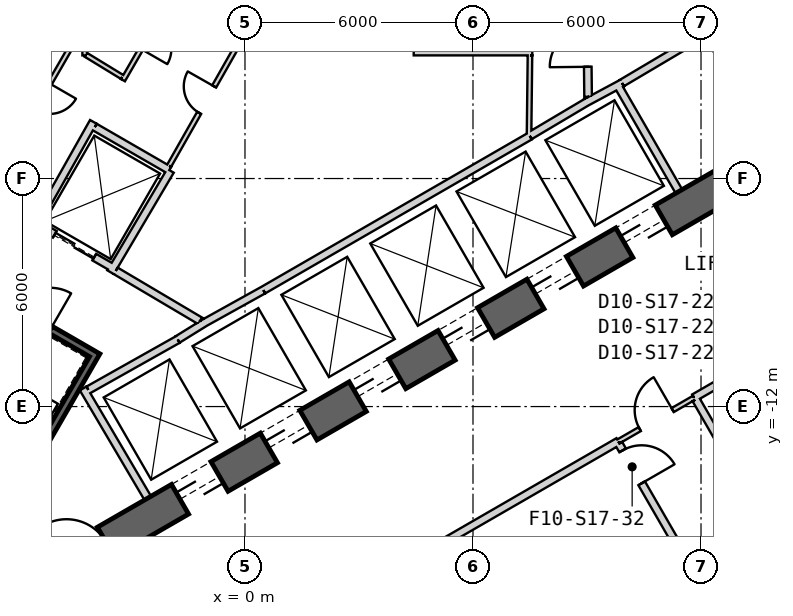
"""IFC4 building model, lengths in metres.
Left out: names, types, materials, properties, quantities, classifications, styles, units other than length and angle.
Written with IfcOpenShell. Run it as: python <this file> out.ifc"""

import sys

from ifc_helpers import new_model, si_unit, direction, frame, frame_2d, origin, place, context, subcontext, project, spatial, rectangle, extrude, element, fill, save


model = new_model("IFC4")
c1 = context("Model", 3, precision=1e-05, world=origin(), true_north=direction((0.0, 1.0)))
c2 = subcontext(c1, "Body", "Model", "MODEL_VIEW")
j1 = project(units=[si_unit("LENGTHUNIT", "METRE"), si_unit("PLANEANGLEUNIT", "RADIAN")], contexts=[c1])
p1 = place(None, origin())
s1 = spatial("IfcSite", under=j1, at=p1, CompositionType="ELEMENT")
p2 = place(p1, origin())
s2 = spatial("IfcBuilding", under=s1, at=p2, CompositionType="ELEMENT")
p3 = place(p2, frame((0.0, 0.0, 265.2)))
s3 = spatial("IfcBuildingStorey", under=s2, at=p3, CompositionType="ELEMENT", Elevation=265.2)
p4 = place(p3, frame((-7.825, -17.97, 0.0), z_axis=(0.0, 0.0, 1.0), x_axis=(0.866028369851, 0.499994862586, 0.0)))
e1 = element("IfcWall", 1, at=p4, inside=s3, PredefinedType="SHEAR", context=c2, shape_type="SweptSolid", body=[
    extrude(rectangle(XDim=31.523, YDim=0.9, at=frame_2d((15.762, 0.0))), origin(), (0.0, 0.0, 1.0), 4.0),
])
p5 = place(p4, frame((7.062, 0.0, 0.0)))
e2 = element("IfcOpeningElement", 2, at=p5, cuts=e1, PredefinedType="OPENING", context=c2, shape_type="SweptSolid", body=[
    extrude(rectangle(XDim=1.2, YDim=2.4, at=frame_2d((0.6, 1.2))), frame((0.0, 0.46, 0.0), z_axis=(0.0, -1.0, 0.0), x_axis=(1.0, 0.0, 0.0)), (0.0, 0.0, 1.0), 0.92),
])
p6 = place(p4, frame((9.762, 0.0, 0.0)))
e3 = element("IfcOpeningElement", 3, at=p6, cuts=e1, PredefinedType="OPENING", context=c2, shape_type="SweptSolid", body=[
    extrude(rectangle(XDim=1.2, YDim=2.4, at=frame_2d((0.6, 1.2))), frame((0.0, 0.46, 0.0), z_axis=(0.0, -1.0, 0.0), x_axis=(1.0, 0.0, 0.0)), (0.0, 0.0, 1.0), 0.92),
])
p7 = place(p4, frame((12.462, 0.0, 0.0)))
e4 = element("IfcOpeningElement", 4, at=p7, cuts=e1, PredefinedType="OPENING", context=c2, shape_type="SweptSolid", body=[
    extrude(rectangle(XDim=1.2, YDim=2.4, at=frame_2d((0.6, 1.2))), frame((0.0, 0.46, 0.0), z_axis=(0.0, -1.0, 0.0), x_axis=(1.0, 0.0, 0.0)), (0.0, 0.0, 1.0), 0.92),
])
p8 = place(p4, frame((15.162, 0.0, 0.0)))
e5 = element("IfcOpeningElement", 5, at=p8, cuts=e1, PredefinedType="OPENING", context=c2, shape_type="SweptSolid", body=[
    extrude(rectangle(XDim=1.2, YDim=2.4, at=frame_2d((0.6, 1.2))), frame((0.0, 0.46, 0.0), z_axis=(0.0, -1.0, 0.0), x_axis=(1.0, 0.0, 0.0)), (0.0, 0.0, 1.0), 0.92),
])
p9 = place(p4, frame((17.862, 0.0, 0.0)))
e6 = element("IfcOpeningElement", 6, at=p9, cuts=e1, PredefinedType="OPENING", context=c2, shape_type="SweptSolid", body=[
    extrude(rectangle(XDim=1.2, YDim=2.4, at=frame_2d((0.6, 1.2))), frame((0.0, 0.46, 0.0), z_axis=(0.0, -1.0, 0.0), x_axis=(1.0, 0.0, 0.0)), (0.0, 0.0, 1.0), 0.92),
])
p10 = place(p4, frame((20.562, 0.0, 0.0)))
e7 = element("IfcOpeningElement", 7, at=p10, cuts=e1, PredefinedType="OPENING", context=c2, shape_type="SweptSolid", body=[
    extrude(rectangle(XDim=1.2, YDim=2.4, at=frame_2d((0.6, 1.2))), frame((0.0, 0.46, 0.0), z_axis=(0.0, -1.0, 0.0), x_axis=(1.0, 0.0, 0.0)), (0.0, 0.0, 1.0), 0.92),
])
p11 = place(p4, frame((26.712, 0.0, 0.0)))
e8 = element("IfcOpeningElement", 8, at=p11, cuts=e1, PredefinedType="OPENING", context=c2, shape_type="SweptSolid", body=[
    extrude(rectangle(XDim=1.2, YDim=2.4, at=frame_2d((0.6, 1.2))), frame((0.0, 0.46, 0.0), z_axis=(0.0, -1.0, 0.0), x_axis=(1.0, 0.0, 0.0)), (0.0, 0.0, 1.0), 0.92),
])
p12 = place(p4, frame((3.612, 0.0, 0.0)))
e9 = element("IfcOpeningElement", 9, at=p12, cuts=e1, PredefinedType="OPENING", context=c2, shape_type="SweptSolid", body=[
    extrude(rectangle(XDim=1.2, YDim=2.4, at=frame_2d((0.6, 1.2))), frame((0.0, 0.46, 0.0), z_axis=(0.0, -1.0, 0.0), x_axis=(1.0, 0.0, 0.0)), (0.0, 0.0, 1.0), 0.92),
])
p13 = place(p3, frame((0.483, -8.936, 0.0), z_axis=(0.0, 0.0, 1.0), x_axis=(0.866030989016, 0.499990325971, 0.0)))
e10 = element("IfcWall", 10, at=p13, inside=s3, PredefinedType="PLUMBINGWALL", context=c2, shape_type="SweptSolid", body=[
    extrude(rectangle(XDim=8.1, YDim=0.2, at=frame_2d((4.05, 0.0))), origin(), (0.0, 0.0, 1.0), 3.7),
])
p14 = place(p3, frame((9.795, -3.525, 0.0), z_axis=(0.0, 0.0, 1.0), x_axis=(0.499984717929, -0.866034226713, 0.0)))
e11 = element("IfcWall", 11, at=p14, inside=s3, PredefinedType="PLUMBINGWALL", context=c2, shape_type="SweptSolid", body=[
    extrude(rectangle(XDim=3.25, YDim=0.2, at=frame_2d((1.625, 0.0))), origin(), (0.0, 0.0, 1.0), 3.7),
])
p15 = place(p3, frame((8.974, -3.999, 0.0), z_axis=(0.0, 0.0, 1.0), x_axis=(0.880907015104, 0.473289373154, 0.0)))
e12 = element("IfcWall", 12, at=p15, inside=s3, PredefinedType="PLUMBINGWALL", context=c2, shape_type="SweptSolid", body=[
    extrude(rectangle(XDim=1.078, YDim=0.2, at=frame_2d((0.539, 0.0))), origin(), (0.0, 0.0, 1.0), 3.7),
])
p16 = place(p3, frame((7.493, -4.878, 0.0), z_axis=(0.0, 0.0, 1.0), x_axis=(0.859981807212, 0.510324691999, 0.0)))
e13 = element("IfcWall", 13, at=p16, inside=s3, PredefinedType="PLUMBINGWALL", context=c2, shape_type="SweptSolid", body=[
    extrude(rectangle(XDim=1.845, YDim=0.2, at=frame_2d((0.922, 0.0))), origin(), (0.0, 0.0, 1.0), 3.7),
])
p17 = place(p3, frame((-2.558, -14.409, 0.0), z_axis=(0.0, 0.0, 1.0), x_axis=(-0.507997497166, 0.861358544901, 0.0)))
e14 = element("IfcWall", 14, at=p17, inside=s3, PredefinedType="PLUMBINGWALL", context=c2, shape_type="SweptSolid", body=[
    extrude(rectangle(XDim=3.35, YDim=0.2, at=frame_2d((1.675, 0.0))), origin(), (0.0, 0.0, 1.0), 3.7),
])
p18 = place(p3, frame((-1.769, -10.237, 0.0), z_axis=(0.0, 0.0, 1.0), x_axis=(-0.871534483978, -0.490334215854, 0.0)))
e15 = element("IfcWall", 15, at=p18, inside=s3, PredefinedType="PLUMBINGWALL", context=c2, shape_type="SweptSolid", body=[
    extrude(rectangle(XDim=2.7, YDim=0.2, at=frame_2d((1.35, 0.0))), origin(), (0.0, 0.0, 1.0), 3.7),
])
p19 = place(p3, frame((-1.024, -9.771, 0.0), z_axis=(0.0, 0.0, 1.0), x_axis=(-0.850348075135, -0.526220629693, 0.0)))
e16 = element("IfcWall", 16, at=p19, inside=s3, PredefinedType="PLUMBINGWALL", context=c2, shape_type="SweptSolid", body=[
    extrude(rectangle(XDim=0.878, YDim=0.2, at=frame_2d((0.439, 0.0))), origin(), (0.0, 0.0, 1.0), 3.7),
])
p20 = place(p3, frame((-1.13, -9.831, 0.0), z_axis=(0.0, 0.0, 1.0), x_axis=(0.874269620932, 0.485440655401, 0.0)))
e17 = element("IfcWall", 17, at=p20, inside=s3, PredefinedType="PLUMBINGWALL", context=c2, shape_type="SweptSolid", body=[
    extrude(rectangle(XDim=1.845, YDim=0.2, at=frame_2d((0.922, 0.0))), origin(), (0.0, 0.0, 1.0), 3.7),
])
p21 = place(p3, frame((-3.905, -10.563, -0.3), z_axis=(0.0, 0.0, 1.0), x_axis=(-0.500012932018, -0.866017937352, 0.0)))
e18 = element("IfcWall", 18, at=p21, inside=s3, PredefinedType="SHEAR", context=c2, shape_type="SweptSolid", body=[
    extrude(rectangle(XDim=8.1, YDim=0.2, at=frame_2d((4.05, 0.0))), origin(), (0.0, 0.0, 1.0), 4.0),
])
p22 = place(p3, frame((-4.041, -10.599, -0.3), z_axis=(0.0, 0.0, 1.0), x_axis=(-0.866047807691, 0.499961193289, 0.0)))
e19 = element("IfcWall", 19, at=p22, inside=s3, PredefinedType="SHEAR", context=c2, shape_type="SweptSolid", body=[
    extrude(rectangle(XDim=3.6, YDim=0.2, at=frame_2d((1.8, 0.0))), origin(), (0.0, 0.0, 1.0), 4.0),
])
p23 = place(p22, frame((1.25, 0.0, 0.3)))
e20 = element("IfcOpeningElement", 20, at=p23, cuts=e19, PredefinedType="OPENING", context=c2, shape_type="SweptSolid", body=[
    extrude(rectangle(XDim=1.1, YDim=2.1, at=frame_2d((0.55, 1.05))), frame((0.0, 0.11, 0.0), z_axis=(0.0, -1.0, 0.0), x_axis=(1.0, 0.0, 0.0)), (0.0, 0.0, 1.0), 0.22),
])
p24 = place(p3, frame((-3.446, -8.368, 0.0), z_axis=(0.0, 0.0, 1.0), x_axis=(-0.866024647952, 0.500001309137, 0.0)))
e21 = element("IfcWall", 21, at=p24, inside=s3, PredefinedType="PLUMBINGWALL", context=c2, shape_type="SweptSolid", body=[
    extrude(rectangle(XDim=2.4, YDim=0.2, at=frame_2d((1.2, 0.0))), origin(), (0.0, 0.0, 1.0), 3.7),
])
p25 = place(p24, frame((0.6, 0.0, 0.0)))
e22 = element("IfcOpeningElement", 22, at=p25, cuts=e21, PredefinedType="OPENING", context=c2, shape_type="SweptSolid", body=[
    extrude(rectangle(XDim=1.2, YDim=2.4, at=frame_2d((0.6, 1.2))), frame((0.0, 0.11, 0.0), z_axis=(0.0, -1.0, 0.0), x_axis=(1.0, 0.0, 0.0)), (0.0, 0.0, 1.0), 0.22),
])
p26 = place(p3, frame((-1.961, -5.796, 0.0), z_axis=(0.0, 0.0, 1.0), x_axis=(-0.508647062354, -0.860975125052, 0.0)))
e23 = element("IfcWall", 23, at=p26, inside=s3, PredefinedType="PLUMBINGWALL", context=c2, shape_type="SweptSolid", body=[
    extrude(rectangle(XDim=3.1, YDim=0.2, at=frame_2d((1.55, 0.0))), origin(), (0.0, 0.0, 1.0), 3.7),
])
p27 = place(p3, frame((-3.99, -4.509, 0.0), z_axis=(0.0, 0.0, 1.0), x_axis=(-0.491358283181, -0.870957540612, 0.0)))
e24 = element("IfcWall", 24, at=p27, inside=s3, PredefinedType="PLUMBINGWALL", context=c2, shape_type="SweptSolid", body=[
    extrude(rectangle(XDim=3.2, YDim=0.2, at=frame_2d((1.6, 0.0))), origin(), (0.0, 0.0, 1.0), 3.7),
])
p28 = place(p3, frame((-3.953, -4.646, 0.0), z_axis=(0.0, 0.0, 1.0), x_axis=(0.866065302921, -0.4999308863, 0.0)))
e25 = element("IfcWall", 25, at=p28, inside=s3, PredefinedType="PLUMBINGWALL", context=c2, shape_type="SweptSolid", body=[
    extrude(rectangle(XDim=2.264, YDim=0.2, at=frame_2d((1.132, 0.0))), origin(), (0.0, 0.0, 1.0), 3.7),
])
p29 = place(p3, frame((12.245, -2.109, 0.0), z_axis=(0.0, 0.0, 1.0), x_axis=(-0.860414880418, -0.509594185166, 0.0)))
e26 = element("IfcWall", 26, at=p29, inside=s3, PredefinedType="PARTITIONING", context=c2, shape_type="SweptSolid", body=[
    extrude(rectangle(XDim=2.7, YDim=0.2, at=frame_2d((1.35, 0.0))), origin(), (0.0, 0.0, 1.0), 3.7),
])
p30 = place(p3, frame((13.758, -4.99, 0.0), z_axis=(0.0, 0.0, 1.0), x_axis=(-0.491993409184, 0.87059892334, 0.0)))
e27 = element("IfcWall", 27, at=p30, inside=s3, PredefinedType="PARTITIONING", context=c2, shape_type="SweptSolid", body=[
    extrude(rectangle(XDim=3.15, YDim=0.2, at=frame_2d((1.575, 0.0))), origin(), (0.0, 0.0, 1.0), 3.7),
])
p31 = place(p30, frame((1.175, 0.0, 0.0)))
e28 = element("IfcOpeningElement", 28, at=p31, cuts=e27, PredefinedType="OPENING", context=c2, shape_type="SweptSolid", body=[
    extrude(rectangle(XDim=0.8, YDim=2.1, at=frame_2d((0.4, 1.05))), frame((0.0, 0.11, 0.0), z_axis=(0.0, -1.0, 0.0), x_axis=(1.0, 0.0, 0.0)), (0.0, 0.0, 1.0), 0.22),
])
p32 = place(p3, frame((9.029, -3.851, 0.0), z_axis=(0.0, 0.0, 1.0), x_axis=(-0.010783593937, 0.99994185536, 0.0)))
e29 = element("IfcWall", 29, at=p32, inside=s3, PredefinedType="PARTITIONING", context=c2, shape_type="SweptSolid", body=[
    extrude(rectangle(XDim=2.581, YDim=0.2, at=frame_2d((1.291, 0.0))), origin(), (0.0, 0.0, 1.0), 3.7),
])
p33 = place(p32, frame((0.791, 0.0, 0.0)))
e30 = element("IfcOpeningElement", 30, at=p33, cuts=e29, PredefinedType="OPENING", context=c2, shape_type="SweptSolid", body=[
    extrude(rectangle(XDim=1.0, YDim=2.1, at=frame_2d((0.5, 1.05))), frame((0.0, 0.11, 0.0), z_axis=(0.0, -1.0, 0.0), x_axis=(1.0, 0.0, 0.0)), (0.0, 0.0, 1.0), 0.22),
])
p34 = place(p3, frame((-3.401, -8.43, 0.0), z_axis=(0.0, 0.0, 1.0), x_axis=(0.860615607571, -0.509255118781, 0.0)))
e31 = element("IfcWall", 31, at=p34, inside=s3, PredefinedType="PARTITIONING", context=c2, shape_type="SweptSolid", body=[
    extrude(rectangle(XDim=2.581, YDim=0.2, at=frame_2d((1.29, 0.0))), origin(), (0.0, 0.0, 1.0), 3.7),
])
p35 = place(p3, frame((0.029, -2.099, 0.0), z_axis=(0.0, 0.0, 1.0), x_axis=(-0.49376265119, -0.869596713592, 0.0)))
e32 = element("IfcWall", 32, at=p35, inside=s3, PredefinedType="PARTITIONING", context=c2, shape_type="SweptSolid", body=[
    extrude(rectangle(XDim=4.097, YDim=0.12, at=frame_2d((2.048, 0.0))), origin(), (0.0, 0.0, 1.0), 3.7),
])
p36 = place(p35, frame((1.7, 0.0, 0.0)))
e33 = element("IfcOpeningElement", 33, at=p36, cuts=e32, PredefinedType="OPENING", context=c2, shape_type="SweptSolid", body=[
    extrude(rectangle(XDim=0.8, YDim=2.1, at=frame_2d((0.4, 1.05))), frame((0.0, 0.07, 0.0), z_axis=(0.0, -1.0, 0.0), x_axis=(1.0, 0.0, 0.0)), (0.0, 0.0, 1.0), 0.14),
])
p37 = place(p3, frame((4.5, -2.76, 0.0), z_axis=(0.0, 0.0, 1.0), x_axis=(0.0, 1.0, 0.0)))
e34 = element("IfcWall", 34, at=p37, inside=s3, PredefinedType="PARTITIONING", context=c2, shape_type="SweptSolid", body=[
    extrude(rectangle(XDim=1.625, YDim=0.12, at=frame_2d((0.812, 0.0))), origin(), (0.0, 0.0, 1.0), 3.7),
])
p38 = place(p3, frame((7.56, -2.7, 0.0), z_axis=(0.0, 0.0, 1.0), x_axis=(-1.0, 0.0, 0.0)))
e35 = element("IfcWall", 35, at=p38, inside=s3, PredefinedType="PARTITIONING", context=c2, shape_type="SweptSolid", body=[
    extrude(rectangle(XDim=3.0, YDim=0.12, at=frame_2d((1.5, 0.0))), origin(), (0.0, 0.0, 1.0), 3.7),
])
p39 = place(p3, frame((7.475, -4.865, 0.0), z_axis=(0.0, 0.0, 1.0), x_axis=(0.011716133148, 0.999931363757, 0.0)))
e36 = element("IfcWall", 36, at=p39, inside=s3, PredefinedType="PARTITIONING", context=c2, shape_type="SweptSolid", body=[
    extrude(rectangle(XDim=2.105, YDim=0.12, at=frame_2d((1.052, 0.0))), origin(), (0.0, 0.0, 1.0), 3.7),
])
p40 = place(p3, frame((-4.219, -2.76, 0.0), z_axis=(0.0, 0.0, 1.0), x_axis=(0.0, 1.0, 0.0)))
e37 = element("IfcWall", 37, at=p40, inside=s3, PredefinedType="PARTITIONING", context=c2, shape_type="SweptSolid", body=[
    extrude(rectangle(XDim=5.521, YDim=0.12, at=frame_2d((2.76, 0.0))), origin(), (0.0, 0.0, 1.0), 3.7),
])
p41 = place(p3, frame((-6.118, -5.197, 0.0), z_axis=(0.0, 0.0, 1.0), x_axis=(0.499979045085, 0.866037501772, 0.0)))
e38 = element("IfcWall", 38, at=p41, inside=s3, PredefinedType="PARTITIONING", context=c2, shape_type="SweptSolid", body=[
    extrude(rectangle(XDim=3.679, YDim=0.12, at=frame_2d((1.839, 0.0))), origin(), (0.0, 0.0, 1.0), 3.7),
])
p42 = place(p41, frame((1.16, 0.0, 0.0)))
e39 = element("IfcOpeningElement", 39, at=p42, cuts=e38, PredefinedType="OPENING", context=c2, shape_type="SweptSolid", body=[
    extrude(rectangle(XDim=0.8, YDim=2.1, at=frame_2d((0.4, 1.05))), frame((0.0, 0.07, 0.0), z_axis=(0.0, -1.0, 0.0), x_axis=(1.0, 0.0, 0.0)), (0.0, 0.0, 1.0), 0.14),
])
p43 = place(p3, frame((-3.211, -3.412, 0.0), z_axis=(0.0, 0.0, 1.0), x_axis=(0.500013727357, 0.866017478146, 0.0)))
e40 = element("IfcWall", 40, at=p43, inside=s3, PredefinedType="PARTITIONING", context=c2, shape_type="SweptSolid", body=[
    extrude(rectangle(XDim=2.636, YDim=0.12, at=frame_2d((1.318, 0.0))), origin(), (0.0, 0.0, 1.0), 3.7),
])
p44 = place(p43, frame((0.948, 0.0, 0.0)))
e41 = element("IfcOpeningElement", 41, at=p44, cuts=e40, PredefinedType="OPENING", context=c2, shape_type="SweptSolid", body=[
    extrude(rectangle(XDim=0.8, YDim=2.1, at=frame_2d((0.4, 1.05))), frame((0.0, 0.07, 0.0), z_axis=(0.0, -1.0, 0.0), x_axis=(1.0, 0.0, 0.0)), (0.0, 0.0, 1.0), 0.14),
])
p45 = place(p3, frame((-4.189, -2.744, 0.0), z_axis=(0.0, 0.0, 1.0), x_axis=(0.853217230587, -0.521555708845, 0.0)))
e42 = element("IfcWall", 42, at=p45, inside=s3, PredefinedType="PARTITIONING", context=c2, shape_type="SweptSolid", body=[
    extrude(rectangle(XDim=1.121, YDim=0.12, at=frame_2d((0.561, 0.0))), origin(), (0.0, 0.0, 1.0), 3.7),
])
p46 = place(p3, frame((9.825, -12.918, 0.0), z_axis=(0.0, 0.0, 1.0), x_axis=(0.86602648383, 0.499998129301, 0.0)))
e43 = element("IfcWall", 43, at=p46, inside=s3, PredefinedType="PARTITIONING", context=c2, shape_type="SweptSolid", body=[
    extrude(rectangle(XDim=2.3, YDim=0.12, at=frame_2d((1.15, 0.0))), origin(), (0.0, 0.0, 1.0), 3.7),
])
p47 = place(p46, frame((0.65, 0.0, 0.0)))
e44 = element("IfcOpeningElement", 44, at=p47, cuts=e43, PredefinedType="OPENING", context=c2, shape_type="SweptSolid", body=[
    extrude(rectangle(XDim=1.0, YDim=2.1, at=frame_2d((0.5, 1.05))), frame((0.0, 0.07, 0.0), z_axis=(0.0, -1.0, 0.0), x_axis=(1.0, 0.0, 0.0)), (0.0, 0.0, 1.0), 0.14),
])
p48 = place(p3, frame((-6.366, -22.266, 0.0), z_axis=(0.0, 0.0, 1.0), x_axis=(0.866027932408, 0.49999562027, 0.0)))
e45 = element("IfcWall", 45, at=p48, inside=s3, PredefinedType="PARTITIONING", context=c2, shape_type="SweptSolid", body=[
    extrude(rectangle(XDim=18.697, YDim=0.2, at=frame_2d((9.348, 0.0))), origin(), (0.0, 0.0, 1.0), 2.98),
])
p49 = place(p3, frame((11.817, -11.768, 0.0), z_axis=(0.0, 0.0, 1.0), x_axis=(0.866029971876, 0.49999208775, 0.0)))
e46 = element("IfcWall", 46, at=p49, inside=s3, PredefinedType="PARTITIONING", context=c2, shape_type="SweptSolid", body=[
    extrude(rectangle(XDim=12.096, YDim=0.2, at=frame_2d((6.048, 0.0))), origin(), (0.0, 0.0, 1.0), 2.98),
])
p50 = place(p3, frame((16.093, -19.134, 0.0), z_axis=(0.0, 0.0, 1.0), x_axis=(-0.500004849665, 0.866022603811, 0.0)))
e47 = element("IfcWall", 47, at=p50, inside=s3, PredefinedType="PARTITIONING", context=c2, shape_type="SweptSolid", body=[
    extrude(rectangle(XDim=8.457, YDim=0.2, at=frame_2d((4.228, 0.0))), origin(), (0.0, 0.0, 1.0), 3.7),
])
p51 = place(p50, frame((3.728, 0.0, 0.0)))
e48 = element("IfcOpeningElement", 48, at=p51, cuts=e47, PredefinedType="OPENING", context=c2, shape_type="SweptSolid", body=[
    extrude(rectangle(XDim=1.0, YDim=2.1, at=frame_2d((0.5, 1.05))), frame((0.0, 0.11, 0.0), z_axis=(0.0, -1.0, 0.0), x_axis=(1.0, 0.0, 0.0)), (0.0, 0.0, 1.0), 0.22),
])
p52 = place(p3, frame((9.838, -12.98, 0.0), z_axis=(0.0, 0.0, 1.0), x_axis=(0.499982124662, -0.866035723869, 0.0)))
e49 = element("IfcWall", 49, at=p52, inside=s3, PredefinedType="PARTITIONING", context=c2, shape_type="SweptSolid", body=[
    extrude(rectangle(XDim=8.274, YDim=0.2, at=frame_2d((4.137, 0.0))), origin(), (0.0, 0.0, 1.0), 3.7),
])
p53 = place(p52, frame((0.2, 0.0, 0.0)))
e50 = element("IfcOpeningElement", 50, at=p53, cuts=e49, PredefinedType="OPENING", context=c2, shape_type="SweptSolid", body=[
    extrude(rectangle(XDim=1.0, YDim=2.1, at=frame_2d((0.5, 1.05))), frame((0.0, 0.11, 0.0), z_axis=(0.0, -1.0, 0.0), x_axis=(1.0, 0.0, 0.0)), (0.0, 0.0, 1.0), 0.22),
])
p54 = place(p33, origin())
e51 = element("IfcDoor", 51, at=p54, inside=s3, OperationType="SINGLE_SWING_RIGHT", PredefinedType="USERDEFINED", context=c2, shape_type="SweptSolid", body=[
    extrude(rectangle(XDim=1.0, YDim=2.1, at=frame_2d((0.5, 1.05))), frame((0.0, 0.025, 0.0), z_axis=(0.0, -1.0, 0.0), x_axis=(1.0, 0.0, 0.0)), (0.0, 0.0, 1.0), 0.05),
])
fill(e30, e51)
p55 = place(p25, origin())
e52 = element("IfcDoor", 52, at=p55, inside=s3, OperationType="SLIDING_TO_LEFT", PredefinedType="USERDEFINED", context=c2, shape_type="SweptSolid", body=[
    extrude(rectangle(XDim=1.2, YDim=2.4, at=frame_2d((0.6, 1.2))), frame((0.0, 0.025, 0.0), z_axis=(0.0, -1.0, 0.0), x_axis=(1.0, 0.0, 0.0)), (0.0, 0.0, 1.0), 0.05),
])
fill(e22, e52)
p56 = place(p36, origin())
e53 = element("IfcDoor", 53, at=p56, inside=s3, OperationType="SINGLE_SWING_RIGHT", PredefinedType="USERDEFINED", context=c2, shape_type="SweptSolid", body=[
    extrude(rectangle(XDim=0.8, YDim=2.1, at=frame_2d((0.4, 1.05))), frame((0.0, 0.025, 0.0), z_axis=(0.0, -1.0, 0.0), x_axis=(1.0, 0.0, 0.0)), (0.0, 0.0, 1.0), 0.05),
])
fill(e33, e53)
p57 = place(p47, origin())
e54 = element("IfcDoor", 54, at=p57, inside=s3, OperationType="SINGLE_SWING_RIGHT", PredefinedType="NOTDEFINED", context=c2, shape_type="SweptSolid", body=[
    extrude(rectangle(XDim=1.0, YDim=2.1, at=frame_2d((0.5, 1.05))), frame((0.0, 0.025, 0.0), z_axis=(0.0, -1.0, 0.0), x_axis=(1.0, 0.0, 0.0)), (0.0, 0.0, 1.0), 0.05),
])
fill(e44, e54)
p58 = place(p53, origin())
e55 = element("IfcDoor", 55, at=p58, inside=s3, OperationType="SINGLE_SWING_RIGHT", PredefinedType="USERDEFINED", context=c2, shape_type="SweptSolid", body=[
    extrude(rectangle(XDim=1.0, YDim=2.1, at=frame_2d((0.5, 1.05))), frame((0.0, 0.025, 0.0), z_axis=(0.0, -1.0, 0.0), x_axis=(1.0, 0.0, 0.0)), (0.0, 0.0, 1.0), 0.05),
])
fill(e50, e55)
p59 = place(p5, origin())
e56 = element("IfcDoor", 56, at=p59, inside=s3, OperationType="SLIDING_TO_LEFT", PredefinedType="USERDEFINED", context=c2, shape_type="SweptSolid", body=[
    extrude(rectangle(XDim=1.2, YDim=2.4, at=frame_2d((0.6, 1.2))), frame((0.0, 0.025, 0.0), z_axis=(0.0, -1.0, 0.0), x_axis=(1.0, 0.0, 0.0)), (0.0, 0.0, 1.0), 0.05),
])
fill(e2, e56)
p60 = place(p6, origin())
e57 = element("IfcDoor", 57, at=p60, inside=s3, OperationType="SLIDING_TO_LEFT", PredefinedType="USERDEFINED", context=c2, shape_type="SweptSolid", body=[
    extrude(rectangle(XDim=1.2, YDim=2.4, at=frame_2d((0.6, 1.2))), frame((0.0, 0.025, 0.0), z_axis=(0.0, -1.0, 0.0), x_axis=(1.0, 0.0, 0.0)), (0.0, 0.0, 1.0), 0.05),
])
fill(e3, e57)
p61 = place(p7, origin())
e58 = element("IfcDoor", 58, at=p61, inside=s3, OperationType="SLIDING_TO_LEFT", PredefinedType="USERDEFINED", context=c2, shape_type="SweptSolid", body=[
    extrude(rectangle(XDim=1.2, YDim=2.4, at=frame_2d((0.6, 1.2))), frame((0.0, 0.025, 0.0), z_axis=(0.0, -1.0, 0.0), x_axis=(1.0, 0.0, 0.0)), (0.0, 0.0, 1.0), 0.05),
])
fill(e4, e58)
p62 = place(p8, origin())
e59 = element("IfcDoor", 59, at=p62, inside=s3, OperationType="SLIDING_TO_LEFT", PredefinedType="USERDEFINED", context=c2, shape_type="SweptSolid", body=[
    extrude(rectangle(XDim=1.2, YDim=2.4, at=frame_2d((0.6, 1.2))), frame((0.0, 0.025, 0.0), z_axis=(0.0, -1.0, 0.0), x_axis=(1.0, 0.0, 0.0)), (0.0, 0.0, 1.0), 0.05),
])
fill(e5, e59)
p63 = place(p9, origin())
e60 = element("IfcDoor", 60, at=p63, inside=s3, OperationType="SLIDING_TO_LEFT", PredefinedType="USERDEFINED", context=c2, shape_type="SweptSolid", body=[
    extrude(rectangle(XDim=1.2, YDim=2.4, at=frame_2d((0.6, 1.2))), frame((0.0, 0.025, 0.0), z_axis=(0.0, -1.0, 0.0), x_axis=(1.0, 0.0, 0.0)), (0.0, 0.0, 1.0), 0.05),
])
fill(e6, e60)
p64 = place(p10, origin())
e61 = element("IfcDoor", 61, at=p64, inside=s3, OperationType="SLIDING_TO_LEFT", PredefinedType="USERDEFINED", context=c2, shape_type="SweptSolid", body=[
    extrude(rectangle(XDim=1.2, YDim=2.4, at=frame_2d((0.6, 1.2))), frame((0.0, 0.025, 0.0), z_axis=(0.0, -1.0, 0.0), x_axis=(1.0, 0.0, 0.0)), (0.0, 0.0, 1.0), 0.05),
])
fill(e7, e61)
save(model, sys.argv[1])
